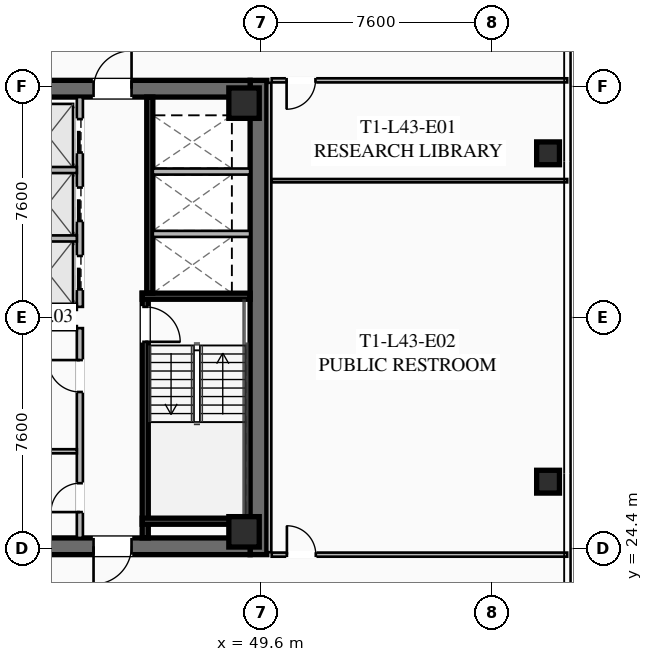
"""IFC4 building model, lengths in metres.
Left out: names, types, materials, properties, quantities, classifications, styles, units other than length and angle.
Written with IfcOpenShell. Run it as: python <this file> out.ifc"""

import sys

from ifc_helpers import new_model, si_unit, direction, frame, frame_2d, origin, origin_2d, place, context, subcontext, project, spatial, rectangle, hollow_rectangle, extrude, element, fill, save


model = new_model("IFC4")
c1 = context("Model", 3, precision=1e-05, world=origin(), true_north=direction((0.0, 1.0)))
c2 = subcontext(c1, "Body", "Model", "MODEL_VIEW")
j1 = project(units=[si_unit("LENGTHUNIT", "METRE"), si_unit("PLANEANGLEUNIT", "RADIAN")], contexts=[c1])
p1 = place(None, origin())
s1 = spatial("IfcSite", under=j1, at=p1, CompositionType="ELEMENT")
p2 = place(p1, origin())
s2 = spatial("IfcBuilding", under=s1, at=p2, CompositionType="ELEMENT")
p3 = place(p2, frame((0.0, 0.0, 160.55)))
s3 = spatial("IfcBuildingStorey", under=s2, at=p3, CompositionType="ELEMENT", Elevation=160.55)
p4 = place(p3, frame((49.525, 39.8, 0.0), z_axis=(0.0, 0.0, 1.0), x_axis=(0.0, -1.0, 0.0)))
e1 = element("IfcWall", 1, at=p4, inside=s3, PredefinedType="SHEAR", context=c2, shape_type="SweptSolid", body=[
    extrude(rectangle(XDim=15.6, YDim=0.55, at=frame_2d((7.8, 0.0))), origin(), (0.0, 0.0, 1.0), 3.55),
])
p5 = place(p3, frame((49.25, 24.475, 0.0), z_axis=(0.0, 0.0, 1.0), x_axis=(-1.0, 0.0, 0.0)))
e2 = element("IfcWall", 2, at=p5, inside=s3, PredefinedType="SHEAR", context=c2, shape_type="SweptSolid", body=[
    extrude(rectangle(XDim=14.5, YDim=0.55, at=frame_2d((7.25, 0.0))), origin(), (0.0, 0.0, 1.0), 3.55),
])
p6 = place(p5, frame((8.95, 0.0, 0.0)))
e3 = element("IfcOpeningElement", 3, at=p6, cuts=e2, PredefinedType="OPENING", context=c2, shape_type="SweptSolid", body=[
    extrude(rectangle(XDim=1.25, YDim=2.25, at=frame_2d((0.625, 1.125))), frame((0.0, 0.285, 0.0), z_axis=(0.0, -1.0, 0.0), x_axis=(1.0, 0.0, 0.0)), (0.0, 0.0, 1.0), 0.57),
])
p7 = place(p5, frame((3.9, 0.0, 0.0)))
e4 = element("IfcOpeningElement", 4, at=p7, cuts=e2, PredefinedType="OPENING", context=c2, shape_type="SweptSolid", body=[
    extrude(rectangle(XDim=1.25, YDim=2.25, at=frame_2d((0.625, 1.125))), frame((0.0, 0.285, 0.0), z_axis=(0.0, -1.0, 0.0), x_axis=(1.0, 0.0, 0.0)), (0.0, 0.0, 1.0), 0.57),
])
p8 = place(p3, frame((34.75, 39.525, 0.0), z_axis=(0.0, 0.0, 1.0), x_axis=(1.0, 0.0, 0.0)))
e5 = element("IfcWall", 5, at=p8, inside=s3, PredefinedType="SHEAR", context=c2, shape_type="SweptSolid", body=[
    extrude(rectangle(XDim=14.5, YDim=0.55, at=frame_2d((7.25, 0.0))), origin(), (0.0, 0.0, 1.0), 3.55),
])
p9 = place(p8, frame((4.3, 0.0, 0.0)))
e6 = element("IfcOpeningElement", 6, at=p9, cuts=e5, PredefinedType="OPENING", context=c2, shape_type="SweptSolid", body=[
    extrude(rectangle(XDim=1.25, YDim=2.25, at=frame_2d((0.625, 1.125))), frame((0.0, 0.285, 0.0), z_axis=(0.0, -1.0, 0.0), x_axis=(1.0, 0.0, 0.0)), (0.0, 0.0, 1.0), 0.57),
])
p10 = place(p8, frame((9.35, 0.0, 0.0)))
e7 = element("IfcOpeningElement", 7, at=p10, cuts=e5, PredefinedType="OPENING", context=c2, shape_type="SweptSolid", body=[
    extrude(rectangle(XDim=1.25, YDim=2.25, at=frame_2d((0.625, 1.125))), frame((0.0, 0.285, 0.0), z_axis=(0.0, -1.0, 0.0), x_axis=(1.0, 0.0, 0.0)), (0.0, 0.0, 1.0), 0.57),
])
for number, where, z_axis, x_axis in (
    (8, (49.05, 24.95, 0.0), (0.0, 0.0, 1.0), (1.0, 0.0, 0.0)),
    (9, (49.05, 39.05, 0.0), (0.0, 0.0, 1.0), (1.0, 0.0, 0.0)),
):
    element("IfcColumn", number, at=place(p3, frame(where, z_axis=z_axis, x_axis=x_axis)), inside=s3, PredefinedType="COLUMN", context=c2, shape_type="SweptSolid", body=[
        extrude(hollow_rectangle(XDim=1.0, YDim=1.0, WallThickness=0.04, at=origin_2d()), origin(), (0.0, 0.0, 1.0), 3.37),
    ])
for number, where, z_axis, x_axis in (
    (10, (59.05, 26.6, 0.0), (0.0, 0.0, 1.0), (1.0, 0.0, 0.0)),
    (11, (59.05, 37.4, 0.0), (0.0, 0.0, 1.0), (1.0, 0.0, 0.0)),
):
    element("IfcColumn", number, at=place(p3, frame(where, z_axis=z_axis, x_axis=x_axis)), inside=s3, PredefinedType="COLUMN", context=c2, shape_type="SweptSolid", body=[
        extrude(hollow_rectangle(XDim=0.75, YDim=0.75, WallThickness=0.032, at=origin_2d()), origin(), (0.0, 0.0, 1.0), 3.37),
    ])
p11 = place(p3, frame((45.8, 32.8, 0.0), z_axis=(0.0, 0.0, 1.0), x_axis=(0.0, -1.0, 0.0)))
e12 = element("IfcWall", 12, at=p11, inside=s3, PredefinedType="SHEAR", context=c2, shape_type="SweptSolid", body=[
    extrude(rectangle(XDim=8.05, YDim=0.2, at=frame_2d((4.025, 0.0))), origin(), (0.0, 0.0, 1.0), 3.37),
])
p12 = place(p11, frame((0.45, 0.0, 0.0)))
e13 = element("IfcOpeningElement", 13, at=p12, cuts=e12, PredefinedType="OPENING", context=c2, shape_type="SweptSolid", body=[
    extrude(rectangle(XDim=1.15, YDim=2.2, at=frame_2d((0.575, 1.1))), frame((0.0, 0.11, 0.0), z_axis=(0.0, -1.0, 0.0), x_axis=(1.0, 0.0, 0.0)), (0.0, 0.0, 1.0), 0.22),
])
for number, where, z_axis, x_axis in (
    (14, (45.7, 32.7, 0.0), (0.0, 0.0, 1.0), (1.0, 0.0, 0.0)),
    (15, (45.7, 25.3, 0.0), (0.0, 0.0, 1.0), (1.0, 0.0, 0.0)),
):
    element("IfcWall", number, at=place(p3, frame(where, z_axis=z_axis, x_axis=x_axis)), inside=s3, PredefinedType="SHEAR", context=c2, shape_type="SweptSolid", body=[
        extrude(rectangle(XDim=3.55, YDim=0.2, at=frame_2d((1.775, 0.0))), origin(), (0.0, 0.0, 1.0), 3.37),
    ])
p13 = place(p3, frame((45.95, 39.25, 0.0), z_axis=(0.0, 0.0, 1.0), x_axis=(0.0, -1.0, 0.0)))
e16 = element("IfcWall", 16, at=p13, inside=s3, PredefinedType="SHEAR", context=c2, shape_type="SweptSolid", body=[
    extrude(rectangle(XDim=6.45, YDim=0.2, at=frame_2d((3.225, 0.0))), origin(), (0.0, 0.0, 1.0), 3.37),
])
for number, where, z_axis, x_axis in (
    (17, (46.05, 34.75, 0.0), (0.0, 0.0, 1.0), (1.0, 0.0, 0.0)),
    (18, (46.05, 36.8, 0.0), (0.0, 0.0, 1.0), (1.0, 0.0, 0.0)),
):
    element("IfcWall", number, at=place(p3, frame(where, z_axis=z_axis, x_axis=x_axis)), inside=s3, PredefinedType="SOLIDWALL", context=c2, shape_type="SweptSolid", body=[
        extrude(rectangle(XDim=3.2, YDim=0.2, at=frame_2d((1.6, 0.0))), origin(), (0.0, 0.0, 1.0), 3.37),
    ])
p14 = place(p3, frame((43.65, 24.75, 0.0), z_axis=(0.0, 0.0, 1.0), x_axis=(0.0, 1.0, 0.0)))
e19 = element("IfcWall", 19, at=p14, inside=s3, PredefinedType="SOLIDWALL", context=c2, shape_type="SweptSolid", body=[
    extrude(rectangle(XDim=6.9, YDim=0.2, at=frame_2d((3.45, 0.0))), origin(), (0.0, 0.0, 1.0), 2.723),
])
p15 = place(p14, frame((0.85, 0.0, 0.0)))
e20 = element("IfcOpeningElement", 20, at=p15, cuts=e19, PredefinedType="OPENING", context=c2, shape_type="SweptSolid", body=[
    extrude(rectangle(XDim=0.95, YDim=2.05, at=frame_2d((0.475, 1.025))), frame((0.0, 0.11, 0.0), z_axis=(0.0, -1.0, 0.0), x_axis=(1.0, 0.0, 0.0)), (0.0, 0.0, 1.0), 0.22),
])
p16 = place(p14, frame((4.8, 0.0, 0.0)))
e21 = element("IfcOpeningElement", 21, at=p16, cuts=e19, PredefinedType="OPENING", context=c2, shape_type="SweptSolid", body=[
    extrude(rectangle(XDim=1.05, YDim=2.2, at=frame_2d((0.525, 1.1))), frame((0.0, 0.11, 0.0), z_axis=(0.0, -1.0, 0.0), x_axis=(1.0, 0.0, 0.0)), (0.0, 0.0, 1.0), 0.22),
])
for number, where, z_axis, x_axis in (
    (22, (41.67, 31.65, 0.0), (0.0, 0.0, 1.0), (1.0, 0.0, 0.0)),
    (23, (41.67, 27.6, 0.0), (0.0, 0.0, 1.0), (1.0, 0.0, 0.0)),
):
    element("IfcWall", number, at=place(p3, frame(where, z_axis=z_axis, x_axis=x_axis)), inside=s3, PredefinedType="PARTITIONING", context=c2, shape_type="SweptSolid", body=[
        extrude(rectangle(XDim=1.88, YDim=0.135, at=frame_2d((0.94, 0.0))), origin(), (0.0, 0.0, 1.0), 2.723),
    ])
p17 = place(p3, frame((43.65, 32.35, 0.0), z_axis=(0.0, 0.0, 1.0), x_axis=(0.0, 1.0, 0.0)))
e24 = element("IfcWall", 24, at=p17, inside=s3, PredefinedType="SOLIDWALL", context=c2, shape_type="SweptSolid", body=[
    extrude(rectangle(XDim=6.9, YDim=0.2, at=frame_2d((3.45, 0.0))), origin(), (0.0, 0.0, 1.0), 3.37),
])
p18 = place(p17, frame((0.575, 0.0, 0.0)))
e25 = element("IfcOpeningElement", 25, at=p18, cuts=e24, PredefinedType="OPENING", context=c2, shape_type="SweptSolid", body=[
    extrude(rectangle(XDim=1.1, YDim=2.2, at=frame_2d((0.55, 1.1))), frame((0.0, 0.11, 0.0), z_axis=(0.0, -1.0, 0.0), x_axis=(1.0, 0.0, 0.0)), (0.0, 0.0, 1.0), 0.22),
])
p19 = place(p17, frame((2.825, 0.0, 0.0)))
e26 = element("IfcOpeningElement", 26, at=p19, cuts=e24, PredefinedType="OPENING", context=c2, shape_type="SweptSolid", body=[
    extrude(rectangle(XDim=1.1, YDim=2.2, at=frame_2d((0.55, 1.1))), frame((0.0, 0.11, 0.0), z_axis=(0.0, -1.0, 0.0), x_axis=(1.0, 0.0, 0.0)), (0.0, 0.0, 1.0), 0.22),
])
p20 = place(p17, frame((5.075, 0.0, 0.0)))
e27 = element("IfcOpeningElement", 27, at=p20, cuts=e24, PredefinedType="OPENING", context=c2, shape_type="SweptSolid", body=[
    extrude(rectangle(XDim=1.1, YDim=2.2, at=frame_2d((0.55, 1.1))), frame((0.0, 0.11, 0.0), z_axis=(0.0, -1.0, 0.0), x_axis=(1.0, 0.0, 0.0)), (0.0, 0.0, 1.0), 0.22),
])
for number, where, z_axis, x_axis in (
    (28, (41.67, 32.35, 0.0), (0.0, 0.0, 1.0), (1.0, 0.0, 0.0)),
    (29, (41.67, 34.6, 0.0), (0.0, 0.0, 1.0), (1.0, 0.0, 0.0)),
    (30, (41.67, 36.85, 0.0), (0.0, 0.0, 1.0), (1.0, 0.0, 0.0)),
):
    element("IfcWall", number, at=place(p3, frame(where, z_axis=z_axis, x_axis=x_axis)), inside=s3, PredefinedType="SOLIDWALL", context=c2, shape_type="SweptSolid", body=[
        extrude(rectangle(XDim=1.88, YDim=0.2, at=frame_2d((0.94, 0.0))), origin(), (0.0, 0.0, 1.0), 3.37),
    ])
p21 = place(p3, frame((49.88, 39.72, 0.0), z_axis=(0.0, 0.0, 1.0), x_axis=(0.0, -1.0, 0.0)))
e31 = element("IfcWall", 31, at=p21, inside=s3, PredefinedType="PARTITIONING", context=c2, shape_type="SweptSolid", body=[
    extrude(rectangle(XDim=15.44, YDim=0.135, at=frame_2d((7.72, 0.0))), origin(), (0.0, 0.0, 1.0), 2.723),
])
p22 = place(p3, frame((59.68, 39.8, 0.0), z_axis=(0.0, 0.0, 1.0), x_axis=(-1.0, 0.0, 0.0)))
e32 = element("IfcWall", 32, at=p22, inside=s3, PredefinedType="PARTITIONING", context=c2, shape_type="SweptSolid", body=[
    extrude(rectangle(XDim=9.72, YDim=0.135, at=frame_2d((4.86, 0.0))), origin(), (0.0, 0.0, 1.0), 2.723),
])
p23 = place(p22, frame((8.28, 0.0, 0.0)))
e33 = element("IfcOpeningElement", 33, at=p23, cuts=e32, PredefinedType="OPENING", context=c2, shape_type="SweptSolid", body=[
    extrude(rectangle(XDim=0.95, YDim=2.05, at=frame_2d((0.475, 1.025))), frame((0.0, 0.077, 0.0), z_axis=(0.0, -1.0, 0.0), x_axis=(1.0, 0.0, 0.0)), (0.0, 0.0, 1.0), 0.155),
])
p24 = place(p3, frame((49.96, 24.2, 0.0), z_axis=(0.0, 0.0, 1.0), x_axis=(1.0, 0.0, 0.0)))
e34 = element("IfcWall", 34, at=p24, inside=s3, PredefinedType="PARTITIONING", context=c2, shape_type="SweptSolid", body=[
    extrude(rectangle(XDim=9.72, YDim=0.135, at=frame_2d((4.86, 0.0))), origin(), (0.0, 0.0, 1.0), 2.723),
])
p25 = place(p24, frame((0.5, 0.0, 0.0)))
e35 = element("IfcOpeningElement", 35, at=p25, cuts=e34, PredefinedType="OPENING", context=c2, shape_type="SweptSolid", body=[
    extrude(rectangle(XDim=0.95, YDim=2.05, at=frame_2d((0.475, 1.025))), frame((0.0, 0.077, 0.0), z_axis=(0.0, -1.0, 0.0), x_axis=(1.0, 0.0, 0.0)), (0.0, 0.0, 1.0), 0.155),
])
p26 = place(p3, frame((49.96, 36.5, 0.0), z_axis=(0.0, 0.0, 1.0), x_axis=(1.0, 0.0, 0.0)))
e36 = element("IfcWall", 36, at=p26, inside=s3, PredefinedType="PARTITIONING", context=c2, shape_type="SweptSolid", body=[
    extrude(rectangle(XDim=9.72, YDim=0.11, at=frame_2d((4.86, 0.0))), origin(), (0.0, 0.0, 1.0), 2.723),
])
p27 = place(p10, origin())
e37 = element("IfcDoor", 37, at=p27, inside=s3, OperationType="SINGLE_SWING_RIGHT", PredefinedType="DOOR", context=c2, shape_type="SweptSolid", body=[
    extrude(rectangle(XDim=1.25, YDim=2.25, at=frame_2d((0.625, 1.125))), frame((0.0, 0.025, 0.0), z_axis=(0.0, -1.0, 0.0), x_axis=(1.0, 0.0, 0.0)), (0.0, 0.0, 1.0), 0.05),
])
fill(e7, e37)
p28 = place(p7, origin())
e38 = element("IfcDoor", 38, at=p28, inside=s3, OperationType="SINGLE_SWING_RIGHT", PredefinedType="DOOR", context=c2, shape_type="SweptSolid", body=[
    extrude(rectangle(XDim=1.25, YDim=2.25, at=frame_2d((0.625, 1.125))), frame((0.0, 0.025, 0.0), z_axis=(0.0, -1.0, 0.0), x_axis=(1.0, 0.0, 0.0)), (0.0, 0.0, 1.0), 0.05),
])
fill(e4, e38)
p29 = place(p12, origin())
e39 = element("IfcDoor", 39, at=p29, inside=s3, OperationType="SINGLE_SWING_RIGHT", PredefinedType="DOOR", context=c2, shape_type="SweptSolid", body=[
    extrude(rectangle(XDim=1.15, YDim=2.2, at=frame_2d((0.575, 1.1))), frame((0.0, 0.025, 0.0), z_axis=(0.0, -1.0, 0.0), x_axis=(1.0, 0.0, 0.0)), (0.0, 0.0, 1.0), 0.05),
])
fill(e13, e39)
p30 = place(p15, origin())
e40 = element("IfcDoor", 40, at=p30, inside=s3, OperationType="SINGLE_SWING_LEFT", PredefinedType="DOOR", context=c2, shape_type="SweptSolid", body=[
    extrude(rectangle(XDim=0.95, YDim=2.05, at=frame_2d((0.475, 1.025))), frame((0.0, 0.025, 0.0), z_axis=(0.0, -1.0, 0.0), x_axis=(1.0, 0.0, 0.0)), (0.0, 0.0, 1.0), 0.05),
])
fill(e20, e40)
p31 = place(p16, origin())
e41 = element("IfcDoor", 41, at=p31, inside=s3, OperationType="SINGLE_SWING_RIGHT", PredefinedType="DOOR", context=c2, shape_type="SweptSolid", body=[
    extrude(rectangle(XDim=1.05, YDim=2.2, at=frame_2d((0.525, 1.1))), frame((0.0, 0.025, 0.0), z_axis=(0.0, -1.0, 0.0), x_axis=(1.0, 0.0, 0.0)), (0.0, 0.0, 1.0), 0.05),
])
fill(e21, e41)
p32 = place(p23, origin())
e42 = element("IfcDoor", 42, at=p32, inside=s3, OperationType="SINGLE_SWING_RIGHT", PredefinedType="DOOR", context=c2, shape_type="SweptSolid", body=[
    extrude(rectangle(XDim=0.95, YDim=2.05, at=frame_2d((0.475, 1.025))), frame((0.0, 0.025, 0.0), z_axis=(0.0, -1.0, 0.0), x_axis=(1.0, 0.0, 0.0)), (0.0, 0.0, 1.0), 0.05),
])
fill(e33, e42)
p33 = place(p25, origin())
e43 = element("IfcDoor", 43, at=p33, inside=s3, OperationType="SINGLE_SWING_LEFT", PredefinedType="DOOR", context=c2, shape_type="SweptSolid", body=[
    extrude(rectangle(XDim=0.95, YDim=2.05, at=frame_2d((0.475, 1.025))), frame((0.0, 0.025, 0.0), z_axis=(0.0, -1.0, 0.0), x_axis=(1.0, 0.0, 0.0)), (0.0, 0.0, 1.0), 0.05),
])
fill(e35, e43)
p34 = place(p18, origin())
e44 = element("IfcDoor", 44, at=p34, inside=s3, OperationType="SLIDING_TO_LEFT", PredefinedType="DOOR", context=c2, shape_type="SweptSolid", body=[
    extrude(rectangle(XDim=1.1, YDim=2.2, at=frame_2d((0.55, 1.1))), frame((0.0, 0.025, 0.0), z_axis=(0.0, -1.0, 0.0), x_axis=(1.0, 0.0, 0.0)), (0.0, 0.0, 1.0), 0.05),
])
fill(e25, e44)
p35 = place(p19, origin())
e45 = element("IfcDoor", 45, at=p35, inside=s3, OperationType="SLIDING_TO_LEFT", PredefinedType="DOOR", context=c2, shape_type="SweptSolid", body=[
    extrude(rectangle(XDim=1.1, YDim=2.2, at=frame_2d((0.55, 1.1))), frame((0.0, 0.025, 0.0), z_axis=(0.0, -1.0, 0.0), x_axis=(1.0, 0.0, 0.0)), (0.0, 0.0, 1.0), 0.05),
])
fill(e26, e45)
p36 = place(p20, origin())
e46 = element("IfcDoor", 46, at=p36, inside=s3, OperationType="SLIDING_TO_LEFT", PredefinedType="DOOR", context=c2, shape_type="SweptSolid", body=[
    extrude(rectangle(XDim=1.1, YDim=2.2, at=frame_2d((0.55, 1.1))), frame((0.0, 0.025, 0.0), z_axis=(0.0, -1.0, 0.0), x_axis=(1.0, 0.0, 0.0)), (0.0, 0.0, 1.0), 0.05),
])
fill(e27, e46)
save(model, sys.argv[1])
